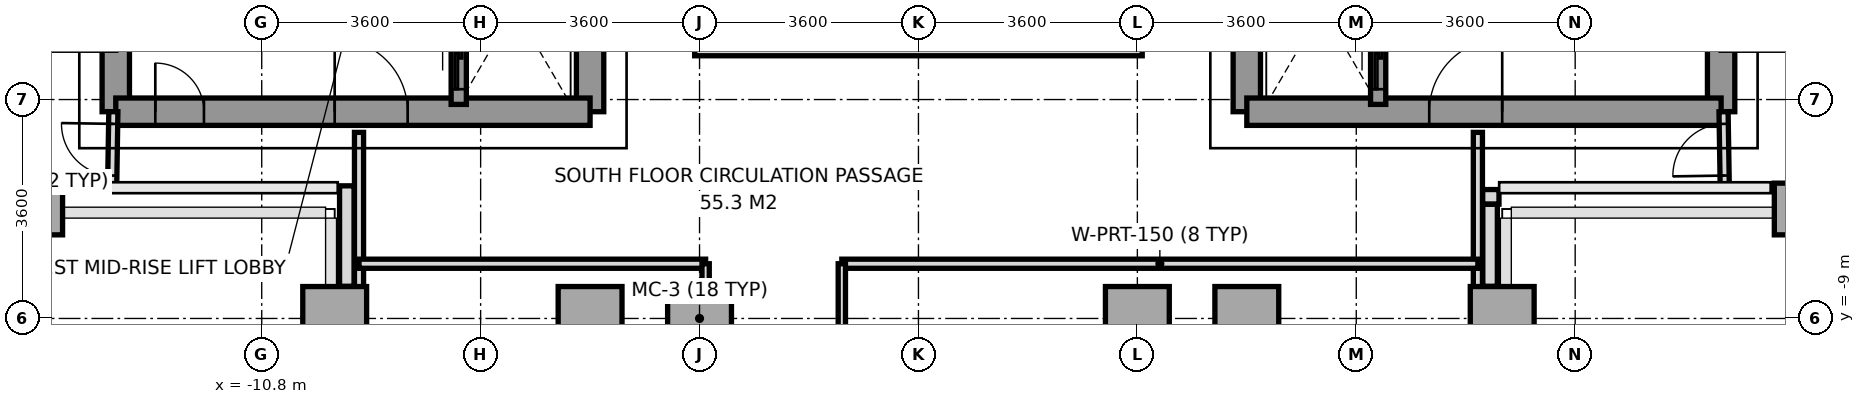
"""IFC4 building model, lengths in metres.
Left out: names, types, materials, properties, quantities, classifications, styles, units other than length and angle.
Written with IfcOpenShell. Run it as: python <this file> out.ifc"""

import sys

from ifc_helpers import new_model, si_unit, direction, frame, frame_2d, origin, origin_2d, place, context, subcontext, project, spatial, rectangle, extrude, source, transform, mapped, element, fill, save


model = new_model("IFC4")
c1 = context("Model", 3, precision=1e-05, world=origin(), true_north=direction((0.0, 1.0)))
c2 = subcontext(c1, "Body", "Model", "MODEL_VIEW")
j1 = project(units=[si_unit("LENGTHUNIT", "METRE"), si_unit("PLANEANGLEUNIT", "RADIAN")], contexts=[c1])
p1 = place(None, origin())
s1 = spatial("IfcSite", under=j1, at=p1, CompositionType="ELEMENT")
p2 = place(p1, origin())
s2 = spatial("IfcBuilding", under=s1, at=p2, CompositionType="ELEMENT")
p3 = place(p2, frame((0.0, 0.0, 100.6)))
s3 = spatial("IfcBuildingStorey", under=s2, at=p3, CompositionType="ELEMENT", Elevation=100.6)
m1 = source(origin(), c2, "Body", "SweptSolid", [
    extrude(rectangle(XDim=0.65, YDim=0.85, at=origin_2d()), origin(), (0.0, 0.0, 1.0), 3.2),
])
p4 = place(p3, frame((-14.4, -7.2, 0.0), z_axis=(0.0, 0.0, 1.0), x_axis=(1.0, 0.0, 0.0)))
e1 = element("IfcColumn", 1, at=p4, inside=s3, PredefinedType="COLUMN", context=c2, shape_type="MappedRepresentation", body=[
    mapped(m1, transform((0.0, 0.0, 0.0), x_axis=(1.0, 0.0, 0.0), y_axis=(0.0, 1.0, 0.0), z_axis=(0.0, 0.0, 1.0), scale=1.0)),
])
m2 = source(origin(), c2, "Body", "SweptSolid", [
    extrude(rectangle(XDim=1.05, YDim=1.05, at=origin_2d()), origin(), (0.0, 0.0, 1.0), 3.2),
])
for number, where, z_axis, x_axis in (
    (2, (-9.6, -9.0, 0.0), (0.0, 0.0, 1.0), (1.0, 0.0, 0.0)),
    (3, (-5.4, -9.0, 0.0), (0.0, 0.0, 1.0), (1.0, 0.0, 0.0)),
    (4, (-3.6, -9.0, 0.0), (0.0, 0.0, 1.0), (1.0, 0.0, 0.0)),
    (5, (3.6, -9.0, 0.0), (0.0, 0.0, 1.0), (1.0, 0.0, 0.0)),
    (6, (5.4, -9.0, 0.0), (0.0, 0.0, 1.0), (1.0, 0.0, 0.0)),
    (7, (9.6, -9.0, 0.0), (0.0, 0.0, 1.0), (1.0, 0.0, 0.0)),
):
    element("IfcColumn", number, at=place(p3, frame(where, z_axis=z_axis, x_axis=x_axis)), inside=s3, PredefinedType="COLUMN", context=c2, shape_type="MappedRepresentation", body=[
        mapped(m2, transform((0.0, 0.0, 0.0), x_axis=(1.0, 0.0, 0.0), y_axis=(0.0, 1.0, 0.0), z_axis=(0.0, 0.0, 1.0), scale=1.0)),
    ])
p5 = place(p3, frame((14.4, -7.2, 0.0), z_axis=(0.0, 0.0, 1.0), x_axis=(1.0, 0.0, 0.0)))
e8 = element("IfcColumn", 8, at=p5, inside=s3, PredefinedType="COLUMN", context=c2, shape_type="MappedRepresentation", body=[
    mapped(m1, transform((0.0, 0.0, 0.0), x_axis=(1.0, 0.0, 0.0), y_axis=(0.0, 1.0, 0.0), z_axis=(0.0, 0.0, 1.0), scale=1.0)),
])
p6 = place(p3, frame((9.547, -7.0, 0.0), z_axis=(0.0, 0.0, 1.0), x_axis=(-1.0, 0.0, 0.0)))
e9 = element("IfcWall", 9, at=p6, inside=s3, PredefinedType="PARAPET", context=c2, shape_type="SweptSolid", body=[
    extrude(rectangle(XDim=0.269, YDim=0.24, at=frame_2d((0.135, 0.0))), origin(), (0.0, 0.0, 1.0), 1.15),
])
p7 = place(p3, frame((9.4, -7.123, 0.0), z_axis=(0.0, 0.0, 1.0), x_axis=(0.0, -1.0, 0.0)))
e10 = element("IfcWall", 10, at=p7, inside=s3, PredefinedType="PARAPET", context=c2, shape_type="SweptSolid", body=[
    extrude(rectangle(XDim=1.349, YDim=0.24, at=frame_2d((0.674, 0.0))), origin(), (0.0, 0.0, 1.0), 1.15),
])
p8 = place(p3, frame((-9.4, -8.472, 0.0), z_axis=(0.0, 0.0, 1.0), x_axis=(0.0, 1.0, 0.0)))
e11 = element("IfcWall", 11, at=p8, inside=s3, PredefinedType="PARAPET", context=c2, shape_type="SweptSolid", body=[
    extrude(rectangle(XDim=1.653, YDim=0.24, at=frame_2d((0.827, 0.0))), origin(), (0.0, 0.0, 1.0), 1.15),
])
p9 = place(p3, frame((-13.2, -5.6, 0.0), z_axis=(0.0, 0.0, 1.0), x_axis=(0.0, 1.0, 0.0)))
e12 = element("IfcWall", 12, at=p9, inside=s3, PredefinedType="SHEAR", context=c2, shape_type="SweptSolid", body=[
    extrude(rectangle(XDim=11.2, YDim=0.45, at=frame_2d((5.6, 0.0))), origin(), (0.0, 0.0, 1.0), 3.2),
])
p10 = place(p3, frame((-5.4, -5.6, 0.0), z_axis=(0.0, 0.0, 1.0), x_axis=(0.0, 1.0, 0.0)))
e13 = element("IfcWall", 13, at=p10, inside=s3, PredefinedType="SHEAR", context=c2, shape_type="SweptSolid", body=[
    extrude(rectangle(XDim=12.5, YDim=0.45, at=frame_2d((6.25, 0.0))), origin(), (0.0, 0.0, 1.0), 3.2),
])
p11 = place(p10, frame((4.55, 0.0, 0.0)))
e14 = element("IfcOpeningElement", 14, at=p11, cuts=e13, PredefinedType="OPENING", context=c2, shape_type="SweptSolid", body=[
    extrude(rectangle(XDim=1.2, YDim=2.2, at=frame_2d((0.6, 1.1))), frame((0.0, 0.235, 0.0), z_axis=(0.0, -1.0, 0.0), x_axis=(1.0, 0.0, 0.0)), (0.0, 0.0, 1.0), 0.47),
])
p12 = place(p10, frame((6.86, 0.0, 0.0)))
e15 = element("IfcOpeningElement", 15, at=p12, cuts=e13, PredefinedType="OPENING", context=c2, shape_type="SweptSolid", body=[
    extrude(rectangle(XDim=0.8, YDim=2.1, at=frame_2d((0.4, 1.05))), frame((0.0, 0.235, 0.0), z_axis=(0.0, -1.0, 0.0), x_axis=(1.0, 0.0, 0.0)), (0.0, 0.0, 1.0), 0.47),
])
p13 = place(p3, frame((-13.2, -5.6, 0.0), z_axis=(0.0, 0.0, 1.0), x_axis=(1.0, 0.0, 0.0)))
e16 = element("IfcWall", 16, at=p13, inside=s3, PredefinedType="SHEAR", context=c2, shape_type="SweptSolid", body=[
    extrude(rectangle(XDim=7.8, YDim=0.45, at=frame_2d((3.9, 0.0))), origin(), (0.0, 0.0, 1.0), 3.2),
])
p14 = place(p13, frame((3.6, 0.0, 0.0)))
e17 = element("IfcOpeningElement", 17, at=p14, cuts=e16, PredefinedType="OPENING", context=c2, shape_type="SweptSolid", body=[
    extrude(rectangle(XDim=1.2, YDim=2.2, at=frame_2d((0.6, 1.1))), frame((0.0, 0.235, 0.0), z_axis=(0.0, -1.0, 0.0), x_axis=(1.0, 0.0, 0.0)), (0.0, 0.0, 1.0), 0.47),
])
p15 = place(p13, frame((0.65, 0.0, 0.0)))
e18 = element("IfcOpeningElement", 18, at=p15, cuts=e16, PredefinedType="OPENING", context=c2, shape_type="SweptSolid", body=[
    extrude(rectangle(XDim=0.8, YDim=2.1, at=frame_2d((0.4, 1.05))), frame((0.0, 0.235, 0.0), z_axis=(0.0, -1.0, 0.0), x_axis=(1.0, 0.0, 0.0)), (0.0, 0.0, 1.0), 0.47),
])
p16 = place(p3, frame((13.2, -5.6, 0.0), z_axis=(0.0, 0.0, 1.0), x_axis=(0.0, 1.0, 0.0)))
e19 = element("IfcWall", 19, at=p16, inside=s3, PredefinedType="SHEAR", context=c2, shape_type="SweptSolid", body=[
    extrude(rectangle(XDim=11.2, YDim=0.45, at=frame_2d((5.6, 0.0))), origin(), (0.0, 0.0, 1.0), 3.2),
])
p17 = place(p3, frame((5.4, -5.6, 0.0), z_axis=(0.0, 0.0, 1.0), x_axis=(0.0, 1.0, 0.0)))
e20 = element("IfcWall", 20, at=p17, inside=s3, PredefinedType="SHEAR", context=c2, shape_type="SweptSolid", body=[
    extrude(rectangle(XDim=12.5, YDim=0.45, at=frame_2d((6.25, 0.0))), origin(), (0.0, 0.0, 1.0), 3.2),
])
p18 = place(p17, frame((4.55, 0.0, 0.0)))
e21 = element("IfcOpeningElement", 21, at=p18, cuts=e20, PredefinedType="OPENING", context=c2, shape_type="SweptSolid", body=[
    extrude(rectangle(XDim=1.2, YDim=2.2, at=frame_2d((0.6, 1.1))), frame((0.0, 0.235, 0.0), z_axis=(0.0, -1.0, 0.0), x_axis=(1.0, 0.0, 0.0)), (0.0, 0.0, 1.0), 0.47),
])
p19 = place(p17, frame((6.86, 0.0, 0.0)))
e22 = element("IfcOpeningElement", 22, at=p19, cuts=e20, PredefinedType="OPENING", context=c2, shape_type="SweptSolid", body=[
    extrude(rectangle(XDim=0.8, YDim=2.1, at=frame_2d((0.4, 1.05))), frame((0.0, 0.235, 0.0), z_axis=(0.0, -1.0, 0.0), x_axis=(1.0, 0.0, 0.0)), (0.0, 0.0, 1.0), 0.47),
])
p20 = place(p3, frame((5.4, -5.6, 0.0), z_axis=(0.0, 0.0, 1.0), x_axis=(1.0, 0.0, 0.0)))
e23 = element("IfcWall", 23, at=p20, inside=s3, PredefinedType="SHEAR", context=c2, shape_type="SweptSolid", body=[
    extrude(rectangle(XDim=7.8, YDim=0.45, at=frame_2d((3.9, 0.0))), origin(), (0.0, 0.0, 1.0), 3.2),
])
p21 = place(p20, frame((3.0, 0.0, 0.0)))
e24 = element("IfcOpeningElement", 24, at=p21, cuts=e23, PredefinedType="OPENING", context=c2, shape_type="SweptSolid", body=[
    extrude(rectangle(XDim=1.2, YDim=2.2, at=frame_2d((0.6, 1.1))), frame((0.0, 0.235, 0.0), z_axis=(0.0, -1.0, 0.0), x_axis=(1.0, 0.0, 0.0)), (0.0, 0.0, 1.0), 0.47),
])
p22 = place(p3, frame((-7.56, -5.48, 0.0), z_axis=(0.0, 0.0, 1.0), x_axis=(0.0, 1.0, 0.0)))
e25 = element("IfcWall", 25, at=p22, inside=s3, PredefinedType="SOLIDWALL", context=c2, shape_type="SweptSolid", body=[
    extrude(rectangle(XDim=1.6, YDim=0.25, at=frame_2d((0.8, 0.0))), origin(), (0.0, 0.0, 1.0), 3.2),
])
p23 = place(p22, frame((0.25, 0.0, 0.0)))
e26 = element("IfcOpeningElement", 26, at=p23, cuts=e25, PredefinedType="OPENING", context=c2, shape_type="SweptSolid", body=[
    extrude(rectangle(XDim=1.1, YDim=2.2, at=frame_2d((0.55, 1.1))), frame((0.0, 0.135, 0.0), z_axis=(0.0, -1.0, 0.0), x_axis=(1.0, 0.0, 0.0)), (0.0, 0.0, 1.0), 0.27),
])
p24 = place(p3, frame((7.56, -5.48, 0.0), z_axis=(0.0, 0.0, 1.0), x_axis=(0.0, 1.0, 0.0)))
e27 = element("IfcWall", 27, at=p24, inside=s3, PredefinedType="SOLIDWALL", context=c2, shape_type="SweptSolid", body=[
    extrude(rectangle(XDim=1.6, YDim=0.25, at=frame_2d((0.8, 0.0))), origin(), (0.0, 0.0, 1.0), 3.2),
])
p25 = place(p24, frame((0.25, 0.0, 0.0)))
e28 = element("IfcOpeningElement", 28, at=p25, cuts=e27, PredefinedType="OPENING", context=c2, shape_type="SweptSolid", body=[
    extrude(rectangle(XDim=1.1, YDim=2.2, at=frame_2d((0.55, 1.1))), frame((0.0, 0.135, 0.0), z_axis=(0.0, -1.0, 0.0), x_axis=(1.0, 0.0, 0.0)), (0.0, 0.0, 1.0), 0.27),
])
for number, where, z_axis, x_axis in (
    (29, (-9.2, -15.68, 0.0), (0.0, 0.0, 1.0), (0.0, 1.0, 0.0)),
    (30, (9.2, -15.68, 0.0), (0.0, 0.0, 1.0), (0.0, 1.0, 0.0)),
):
    element("IfcWall", number, at=place(p3, frame(where, z_axis=z_axis, x_axis=x_axis)), inside=s3, PredefinedType="PARTITIONING", context=c2, shape_type="SweptSolid", body=[
        extrude(rectangle(XDim=9.74, YDim=0.15, at=frame_2d((4.87, 0.0))), origin(), (0.0, 0.0, 1.0), 2.7),
    ])
p26 = place(p3, frame((-9.2, -8.1, 0.0), z_axis=(0.0, 0.0, 1.0), x_axis=(1.0, 0.0, 0.0)))
e31 = element("IfcWall", 31, at=p26, inside=s3, PredefinedType="PARTITIONING", context=c2, shape_type="SweptSolid", body=[
    extrude(rectangle(XDim=5.7, YDim=0.15, at=frame_2d((2.85, 0.0))), origin(), (0.0, 0.0, 1.0), 2.75),
])
p27 = place(p3, frame((-1.26, -8.1, 0.0), z_axis=(0.0, 0.0, 1.0), x_axis=(1.0, 0.0, 0.0)))
e32 = element("IfcWall", 32, at=p27, inside=s3, PredefinedType="PARTITIONING", context=c2, shape_type="SweptSolid", body=[
    extrude(rectangle(XDim=10.46, YDim=0.15, at=frame_2d((5.23, 0.0))), origin(), (0.0, 0.0, 1.0), 2.75),
])
p28 = place(p3, frame((-3.5, -20.42, 0.0), z_axis=(0.0, 0.0, 1.0), x_axis=(0.0, 1.0, 0.0)))
e33 = element("IfcWall", 33, at=p28, inside=s3, PredefinedType="PARTITIONING", context=c2, shape_type="SweptSolid", body=[
    extrude(rectangle(XDim=12.32, YDim=0.12, at=frame_2d((6.16, 0.0))), origin(), (0.0, 0.0, 1.0), 2.7),
])
p29 = place(p28, frame((2.2, 0.0, 0.0)))
e34 = element("IfcOpeningElement", 34, at=p29, cuts=e33, PredefinedType="OPENING", context=c2, shape_type="SweptSolid", body=[
    extrude(rectangle(XDim=0.95, YDim=2.15, at=frame_2d((0.475, 1.075))), frame((0.0, 0.07, 0.0), z_axis=(0.0, -1.0, 0.0), x_axis=(1.0, 0.0, 0.0)), (0.0, 0.0, 1.0), 0.14),
])
p30 = place(p3, frame((-1.26, -20.42, 0.0), z_axis=(0.0, 0.0, 1.0), x_axis=(0.0, 1.0, 0.0)))
e35 = element("IfcWall", 35, at=p30, inside=s3, PredefinedType="PARTITIONING", context=c2, shape_type="SweptSolid", body=[
    extrude(rectangle(XDim=12.32, YDim=0.12, at=frame_2d((6.16, 0.0))), origin(), (0.0, 0.0, 1.0), 2.7),
])
p31 = place(p30, frame((7.22, 0.0, 0.0)))
e36 = element("IfcOpeningElement", 36, at=p31, cuts=e35, PredefinedType="OPENING", context=c2, shape_type="SweptSolid", body=[
    extrude(rectangle(XDim=0.95, YDim=2.15, at=frame_2d((0.475, 1.075))), frame((0.0, 0.07, 0.0), z_axis=(0.0, -1.0, 0.0), x_axis=(1.0, 0.0, 0.0)), (0.0, 0.0, 1.0), 0.14),
])
p32 = place(p30, frame((1.2, 0.0, 0.0)))
e37 = element("IfcOpeningElement", 37, at=p32, cuts=e35, PredefinedType="OPENING", context=c2, shape_type="SweptSolid", body=[
    extrude(rectangle(XDim=0.95, YDim=2.15, at=frame_2d((0.475, 1.075))), frame((0.0, 0.07, 0.0), z_axis=(0.0, -1.0, 0.0), x_axis=(1.0, 0.0, 0.0)), (0.0, 0.0, 1.0), 0.14),
])
p33 = place(p3, frame((-13.26, -6.85, 0.0), z_axis=(0.0, 0.0, 1.0), x_axis=(0.016013571389, 0.999871774545, 0.0)))
e38 = element("IfcWall", 38, at=p33, inside=s3, PredefinedType="PARTITIONING", context=c2, shape_type="SweptSolid", body=[
    extrude(rectangle(XDim=1.25, YDim=0.15, at=frame_2d((0.625, 0.0))), origin(), (0.0, 0.0, 1.0), 3.2),
])
p34 = place(p33, frame((0.2, 0.0, 0.0)))
e39 = element("IfcOpeningElement", 39, at=p34, cuts=e38, PredefinedType="OPENING", context=c2, shape_type="SweptSolid", body=[
    extrude(rectangle(XDim=0.85, YDim=2.1, at=frame_2d((0.425, 1.05))), frame((0.0, 0.085, 0.0), z_axis=(0.0, -1.0, 0.0), x_axis=(1.0, 0.0, 0.0)), (0.0, 0.0, 1.0), 0.17),
])
p35 = place(p3, frame((13.26, -6.85, 0.0), z_axis=(0.0, 0.0, 1.0), x_axis=(-0.016013571389, 0.999871774545, 0.0)))
e40 = element("IfcWall", 40, at=p35, inside=s3, PredefinedType="PARTITIONING", context=c2, shape_type="SweptSolid", body=[
    extrude(rectangle(XDim=1.25, YDim=0.15, at=frame_2d((0.625, 0.0))), origin(), (0.0, 0.0, 1.0), 3.2),
])
p36 = place(p35, frame((0.2, 0.0, 0.0)))
e41 = element("IfcOpeningElement", 41, at=p36, cuts=e40, PredefinedType="OPENING", context=c2, shape_type="SweptSolid", body=[
    extrude(rectangle(XDim=0.85, YDim=2.1, at=frame_2d((0.425, 1.05))), frame((0.0, 0.085, 0.0), z_axis=(0.0, -1.0, 0.0), x_axis=(1.0, 0.0, 0.0)), (0.0, 0.0, 1.0), 0.17),
])
p37 = place(p3, frame((-3.68, -4.56, 0.0), z_axis=(0.0, 0.0, 1.0), x_axis=(1.0, 0.0, 0.0)))
e42 = element("IfcWall", 42, at=p37, inside=s3, PredefinedType="PARAPET", context=c2, shape_type="SweptSolid", body=[
    extrude(rectangle(XDim=7.36, YDim=0.24, at=frame_2d((3.68, 0.0))), origin(), (0.0, 0.0, 1.0), 1.15),
])
m3 = source(origin(), c2, "Body", "SweptSolid", [
    extrude(rectangle(XDim=1.2, YDim=2.2, at=frame_2d((0.6, 1.1))), frame((0.0, 0.025, 0.0), z_axis=(0.0, -1.0, 0.0), x_axis=(1.0, 0.0, 0.0)), (0.0, 0.0, 1.0), 0.05),
])
p38 = place(p14, origin())
e43 = element("IfcDoor", 43, at=p38, inside=s3, OperationType="SINGLE_SWING_LEFT", PredefinedType="DOOR", context=c2, shape_type="MappedRepresentation", body=[
    mapped(m3, transform((0.0, 0.0, 0.0), x_axis=(1.0, 0.0, 0.0), y_axis=(0.0, 1.0, 0.0), z_axis=(0.0, 0.0, 1.0), scale=1.0)),
])
fill(e17, e43)
p39 = place(p21, origin())
e44 = element("IfcDoor", 44, at=p39, inside=s3, OperationType="SINGLE_SWING_RIGHT", PredefinedType="DOOR", context=c2, shape_type="MappedRepresentation", body=[
    mapped(m3, transform((0.0, 0.0, 0.0), x_axis=(1.0, 0.0, 0.0), y_axis=(0.0, 1.0, 0.0), z_axis=(0.0, 0.0, 1.0), scale=1.0)),
])
fill(e24, e44)
m4 = source(origin(), c2, "Body", "SweptSolid", [
    extrude(rectangle(XDim=0.8, YDim=2.1, at=frame_2d((0.4, 1.05))), frame((0.0, 0.025, 0.0), z_axis=(0.0, -1.0, 0.0), x_axis=(1.0, 0.0, 0.0)), (0.0, 0.0, 1.0), 0.05),
])
p40 = place(p15, origin())
e45 = element("IfcDoor", 45, at=p40, inside=s3, OperationType="SINGLE_SWING_LEFT", PredefinedType="DOOR", context=c2, shape_type="MappedRepresentation", body=[
    mapped(m4, transform((0.0, 0.0, 0.0), x_axis=(1.0, 0.0, 0.0), y_axis=(0.0, 1.0, 0.0), z_axis=(0.0, 0.0, 1.0), scale=1.0)),
])
fill(e18, e45)
m5 = source(origin(), c2, "Body", "SweptSolid", [
    extrude(rectangle(XDim=1.1, YDim=2.2, at=frame_2d((0.55, 1.1))), frame((0.0, 0.025, 0.0), z_axis=(0.0, -1.0, 0.0), x_axis=(1.0, 0.0, 0.0)), (0.0, 0.0, 1.0), 0.05),
])
p41 = place(p23, origin())
e46 = element("IfcDoor", 46, at=p41, inside=s3, OperationType="SLIDING_TO_LEFT", PredefinedType="DOOR", context=c2, shape_type="MappedRepresentation", body=[
    mapped(m5, transform((0.0, 0.0, 0.0), x_axis=(1.0, 0.0, 0.0), y_axis=(0.0, 1.0, 0.0), z_axis=(0.0, 0.0, 1.0), scale=1.0)),
])
fill(e26, e46)
p42 = place(p25, origin())
e47 = element("IfcDoor", 47, at=p42, inside=s3, OperationType="SLIDING_TO_LEFT", PredefinedType="DOOR", context=c2, shape_type="MappedRepresentation", body=[
    mapped(m5, transform((0.0, 0.0, 0.0), x_axis=(1.0, 0.0, 0.0), y_axis=(0.0, 1.0, 0.0), z_axis=(0.0, 0.0, 1.0), scale=1.0)),
])
fill(e28, e47)
m6 = source(origin(), c2, "Body", "SweptSolid", [
    extrude(rectangle(XDim=0.85, YDim=2.1, at=frame_2d((0.425, 1.05))), frame((0.0, 0.025, 0.0), z_axis=(0.0, -1.0, 0.0), x_axis=(1.0, 0.0, 0.0)), (0.0, 0.0, 1.0), 0.05),
])
p43 = place(p34, origin())
e48 = element("IfcDoor", 48, at=p43, inside=s3, OperationType="SINGLE_SWING_RIGHT", PredefinedType="DOOR", context=c2, shape_type="MappedRepresentation", body=[
    mapped(m6, transform((0.0, 0.0, 0.0), x_axis=(1.0, 0.0, 0.0), y_axis=(0.0, 1.0, 0.0), z_axis=(0.0, 0.0, 1.0), scale=1.0)),
])
fill(e39, e48)
p44 = place(p36, origin())
e49 = element("IfcDoor", 49, at=p44, inside=s3, OperationType="SINGLE_SWING_LEFT", PredefinedType="DOOR", context=c2, shape_type="MappedRepresentation", body=[
    mapped(m6, transform((0.0, 0.0, 0.0), x_axis=(1.0, 0.0, 0.0), y_axis=(0.0, 1.0, 0.0), z_axis=(0.0, 0.0, 1.0), scale=1.0)),
])
fill(e41, e49)
save(model, sys.argv[1])
